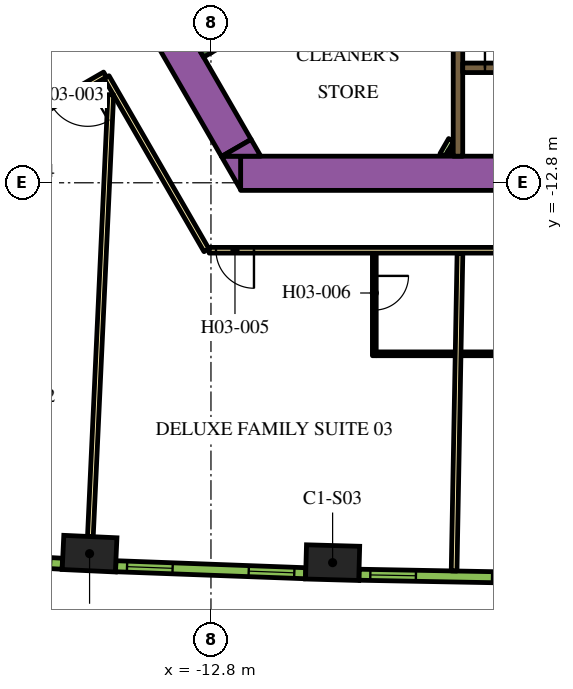
"""IFC4 building model, lengths in metres.
Left out: names, types, materials, properties, quantities, classifications, styles, units other than length and angle.
Written with IfcOpenShell. Run it as: python <this file> out.ifc"""

import sys

from ifc_helpers import new_model, si_unit, direction, frame, frame_2d, origin, origin_2d, place, context, subcontext, project, spatial, polyline, rectangle, outline, extrude, element, fill, save


model = new_model("IFC4")
c1 = context("Model", 3, precision=1e-05, world=origin(), true_north=direction((0.0, 1.0)))
c2 = subcontext(c1, "Body", "Model", "MODEL_VIEW")
j1 = project(units=[si_unit("LENGTHUNIT", "METRE"), si_unit("PLANEANGLEUNIT", "RADIAN")], contexts=[c1])
p1 = place(None, origin())
s1 = spatial("IfcSite", under=j1, at=p1, CompositionType="ELEMENT")
p2 = place(p1, origin())
s2 = spatial("IfcBuilding", under=s1, at=p2, CompositionType="ELEMENT")
p3 = place(p2, frame((0.0, 0.0, 51.0)))
s3 = spatial("IfcBuildingStorey", under=s2, at=p3, CompositionType="ELEMENT", Elevation=51.0)
for number, where, z_axis, x_axis in (
    (1, (-15.994, -22.558, 0.0), (0.0, 0.0, 1.0), (0.999, -0.046, 0.0)),
    (2, (-9.599, -22.795, 0.0), (0.0, 0.0, 1.0), (1.0, -0.028, 0.0)),
):
    element("IfcColumn", number, at=place(p3, frame(where, z_axis=z_axis, x_axis=x_axis)), inside=s3, PredefinedType="COLUMN", context=c2, shape_type="SweptSolid", body=[
        extrude(rectangle(XDim=1.4, YDim=0.9, at=origin_2d()), origin(), (0.0, 0.0, 1.0), 3.9),
    ])
p4 = place(p3, frame((-12.019, -12.55, 0.0), z_axis=(0.0, 0.0, 1.0), x_axis=(1.0, 0.0, 0.0)))
e3 = element("IfcWall", 3, at=p4, inside=s3, PredefinedType="SOLIDWALL", context=c2, shape_type="SweptSolid", body=[
    extrude(rectangle(XDim=22.083, YDim=0.9, at=frame_2d((11.042, 0.0))), origin(), (0.0, 0.0, 1.0), 3.9),
])
p5 = place(p3, origin())
e4 = element("IfcWall", 4, at=p5, inside=s3, PredefinedType="SOLIDWALL", context=c2, shape_type="SweptSolid", body=[
    extrude(outline(polyline([(-12.529, -12.1), (-12.021, -12.1), (-12.021, -12.98), (-12.529, -12.1)])), origin(), (0.0, 0.0, 1.0), 3.9),
])
p6 = place(p3, frame((-12.134, -11.883, 0.0), z_axis=(0.0, 0.0, 1.0), x_axis=(-0.500005339912, 0.866022320763, 0.0)))
e5 = element("IfcWall", 5, at=p6, inside=s3, PredefinedType="SOLIDWALL", context=c2, shape_type="SweptSolid", body=[
    extrude(rectangle(XDim=9.488, YDim=0.9, at=frame_2d((4.744, 0.0))), origin(), (0.0, 0.0, 1.0), 3.9),
])
e6 = element("IfcWall", 6, at=p5, inside=s3, PredefinedType="SOLIDWALL", context=c2, shape_type="SweptSolid", body=[
    extrude(outline(polyline([(-11.489, -12.1), (-12.505, -12.1), (-11.743, -11.66), (-11.489, -12.1)])), origin(), (0.0, 0.0, 1.0), 3.9),
])
p7 = place(p3, frame((-12.885, -9.431, 0.0), z_axis=(0.0, 0.0, 1.0), x_axis=(-0.500020560727, 0.866013532718, 0.0)))
e7 = element("IfcWall", 7, at=p7, inside=s3, PredefinedType="SOLIDWALL", context=c2, shape_type="SweptSolid", body=[
    extrude(rectangle(XDim=3.45, YDim=0.25, at=frame_2d((1.725, 0.0))), origin(), (0.0, 0.0, 1.0), 3.9),
])
p8 = place(p3, frame((-12.84, -9.261, 0.0), z_axis=(0.0, 0.0, 1.0), x_axis=(0.866016039709, 0.500016218704, 0.0)))
e8 = element("IfcWall", 8, at=p8, inside=s3, PredefinedType="SOLIDWALL", context=c2, shape_type="SweptSolid", body=[
    extrude(rectangle(XDim=7.05, YDim=0.25, at=frame_2d((3.525, 0.0))), origin(), (0.0, 0.0, 1.0), 3.9),
])
p9 = place(p3, frame((-6.3, -12.1, 0.0), z_axis=(0.0, 0.0, 1.0), x_axis=(0.0, 1.0, 0.0)))
e9 = element("IfcWall", 9, at=p9, inside=s3, PredefinedType="SOLIDWALL", context=c2, shape_type="SweptSolid", body=[
    extrude(rectangle(XDim=3.146, YDim=0.25, at=frame_2d((1.573, 0.0))), origin(), (0.0, 0.0, 1.0), 3.9),
])
p10 = place(p3, frame((-6.708, -12.068, 0.0), z_axis=(0.0, 0.0, 1.0), x_axis=(0.500000789788, 0.8660249478, 0.0)))
e10 = element("IfcWall", 10, at=p10, inside=s3, PredefinedType="PARTITIONING", context=c2, shape_type="SweptSolid", body=[
    extrude(rectangle(XDim=0.456, YDim=0.15, at=frame_2d((0.228, 0.0))), origin(), (0.0, 0.0, 1.0), 2.75),
])
p11 = place(p3, frame((-6.534, -12.068, 0.0), z_axis=(0.0, 0.0, 1.0), x_axis=(0.500240224089, 0.865886665912, 0.0)))
e11 = element("IfcWall", 11, at=p11, inside=s3, PredefinedType="PARTITIONING", context=c2, shape_type="SweptSolid", body=[
    extrude(rectangle(XDim=0.109, YDim=0.15, at=frame_2d((0.054, 0.0))), origin(), (0.0, 0.0, 1.0), 2.75),
])
p12 = place(p3, frame((-6.175, -9.775, 0.0), z_axis=(0.0, 0.0, 1.0), x_axis=(1.0, 0.0, 0.0)))
e12 = element("IfcWall", 12, at=p12, inside=s3, PredefinedType="SOLIDWALL", context=c2, shape_type="SweptSolid", body=[
    extrude(rectangle(XDim=12.35, YDim=0.25, at=frame_2d((6.175, 0.0))), origin(), (0.0, 0.0, 1.0), 3.9),
])
p13 = place(p12, frame((0.585, 0.0, 0.0)))
e13 = element("IfcOpeningElement", 13, at=p13, cuts=e12, PredefinedType="OPENING", context=c2, shape_type="SweptSolid", body=[
    extrude(rectangle(XDim=1.1, YDim=2.1, at=frame_2d((0.55, 1.05))), frame((0.0, 0.135, 0.0), z_axis=(0.0, -1.0, 0.0), x_axis=(1.0, 0.0, 0.0)), (0.0, 0.0, 1.0), 0.27),
])
p14 = place(p12, frame((3.105, 0.0, 0.0)))
e14 = element("IfcOpeningElement", 14, at=p14, cuts=e12, PredefinedType="OPENING", context=c2, shape_type="SweptSolid", body=[
    extrude(rectangle(XDim=1.1, YDim=2.1, at=frame_2d((0.55, 1.05))), frame((0.0, 0.135, 0.0), z_axis=(0.0, -1.0, 0.0), x_axis=(1.0, 0.0, 0.0)), (0.0, 0.0, 1.0), 0.27),
])
p15 = place(p12, frame((5.625, 0.0, 0.0)))
e15 = element("IfcOpeningElement", 15, at=p15, cuts=e12, PredefinedType="OPENING", context=c2, shape_type="SweptSolid", body=[
    extrude(rectangle(XDim=1.1, YDim=2.1, at=frame_2d((0.55, 1.05))), frame((0.0, 0.135, 0.0), z_axis=(0.0, -1.0, 0.0), x_axis=(1.0, 0.0, 0.0)), (0.0, 0.0, 1.0), 0.27),
])
p16 = place(p12, frame((8.145, 0.0, 0.0)))
e16 = element("IfcOpeningElement", 16, at=p16, cuts=e12, PredefinedType="OPENING", context=c2, shape_type="SweptSolid", body=[
    extrude(rectangle(XDim=1.1, YDim=2.1, at=frame_2d((0.55, 1.05))), frame((0.0, 0.135, 0.0), z_axis=(0.0, -1.0, 0.0), x_axis=(1.0, 0.0, 0.0)), (0.0, 0.0, 1.0), 0.27),
])
p17 = place(p12, frame((10.665, 0.0, 0.0)))
e17 = element("IfcOpeningElement", 17, at=p17, cuts=e12, PredefinedType="OPENING", context=c2, shape_type="SweptSolid", body=[
    extrude(rectangle(XDim=1.1, YDim=2.1, at=frame_2d((0.55, 1.05))), frame((0.0, 0.135, 0.0), z_axis=(0.0, -1.0, 0.0), x_axis=(1.0, 0.0, 0.0)), (0.0, 0.0, 1.0), 0.27),
])
p18 = place(p3, frame((-30.463, -16.635, 0.0), z_axis=(0.0, 0.0, 1.0), x_axis=(0.866022394896, 0.500005211512, 0.0)))
e18 = element("IfcWall", 18, at=p18, inside=s3, PredefinedType="PARTITIONING", context=c2, shape_type="SweptSolid", body=[
    extrude(rectangle(XDim=16.144, YDim=0.15, at=frame_2d((8.072, 0.0))), origin(), (0.0, 0.0, 1.0), 2.75),
])
p19 = place(p18, frame((11.004, 0.0, 0.0)))
e19 = element("IfcOpeningElement", 19, at=p19, cuts=e18, PredefinedType="OPENING", context=c2, shape_type="SweptSolid", body=[
    extrude(rectangle(XDim=1.0, YDim=2.1, at=frame_2d((0.5, 1.05))), frame((0.0, 0.085, 0.0), z_axis=(0.0, -1.0, 0.0), x_axis=(1.0, 0.0, 0.0)), (0.0, 0.0, 1.0), 0.17),
])
p20 = place(p18, frame((7.274, 0.0, 0.0)))
e20 = element("IfcOpeningElement", 20, at=p20, cuts=e18, PredefinedType="OPENING", context=c2, shape_type="SweptSolid", body=[
    extrude(rectangle(XDim=1.0, YDim=2.1, at=frame_2d((0.5, 1.05))), frame((0.0, 0.085, 0.0), z_axis=(0.0, -1.0, 0.0), x_axis=(1.0, 0.0, 0.0)), (0.0, 0.0, 1.0), 0.17),
])
p21 = place(p3, frame((-15.587, -9.952, 0.0), z_axis=(0.0, 0.0, 1.0), x_axis=(-0.866022197818, -0.500005552856, 0.0)))
e21 = element("IfcWall", 21, at=p21, inside=s3, PredefinedType="PARTITIONING", context=c2, shape_type="SweptSolid", body=[
    extrude(rectangle(XDim=16.224, YDim=0.15, at=frame_2d((8.112, 0.0))), origin(), (0.0, 0.0, 1.0), 2.75),
])
p22 = place(p21, frame((7.949, 0.0, 0.0)))
e22 = element("IfcOpeningElement", 22, at=p22, cuts=e21, PredefinedType="OPENING", context=c2, shape_type="SweptSolid", body=[
    extrude(rectangle(XDim=1.0, YDim=2.1, at=frame_2d((0.5, 1.05))), frame((0.0, 0.085, 0.0), z_axis=(0.0, -1.0, 0.0), x_axis=(1.0, 0.0, 0.0)), (0.0, 0.0, 1.0), 0.17),
])
p23 = place(p21, frame((0.525, 0.0, 0.0)))
e23 = element("IfcOpeningElement", 23, at=p23, cuts=e21, PredefinedType="OPENING", context=c2, shape_type="SweptSolid", body=[
    extrude(rectangle(XDim=1.1, YDim=2.1, at=frame_2d((0.55, 1.05))), frame((0.0, 0.085, 0.0), z_axis=(0.0, -1.0, 0.0), x_axis=(1.0, 0.0, 0.0)), (0.0, 0.0, 1.0), 0.17),
])
p24 = place(p3, frame((-12.918, -14.575, 0.0), z_axis=(0.0, 0.0, 1.0), x_axis=(-0.500009150678, 0.866020120573, 0.0)))
e24 = element("IfcWall", 24, at=p24, inside=s3, PredefinedType="PARTITIONING", context=c2, shape_type="SweptSolid", body=[
    extrude(rectangle(XDim=5.258, YDim=0.15, at=frame_2d((2.629, 0.0))), origin(), (0.0, 0.0, 1.0), 2.75),
])
p25 = place(p3, frame((12.918, -14.575, 0.0), z_axis=(0.0, 0.0, 1.0), x_axis=(-1.0, 0.0, 0.0)))
e25 = element("IfcWall", 25, at=p25, inside=s3, PredefinedType="PARTITIONING", context=c2, shape_type="SweptSolid", body=[
    extrude(rectangle(XDim=25.766, YDim=0.15, at=frame_2d((12.883, 0.0))), origin(), (0.0, 0.0, 1.0), 2.75),
])
p26 = place(p25, frame((24.586, 0.0, 0.0)))
e26 = element("IfcOpeningElement", 26, at=p26, cuts=e25, PredefinedType="OPENING", context=c2, shape_type="SweptSolid", body=[
    extrude(rectangle(XDim=1.0, YDim=2.1, at=frame_2d((0.5, 1.05))), frame((0.0, 0.085, 0.0), z_axis=(0.0, -1.0, 0.0), x_axis=(1.0, 0.0, 0.0)), (0.0, 0.0, 1.0), 0.17),
])
p27 = place(p25, frame((9.948, 0.0, 0.0)))
e27 = element("IfcOpeningElement", 27, at=p27, cuts=e25, PredefinedType="OPENING", context=c2, shape_type="SweptSolid", body=[
    extrude(rectangle(XDim=1.0, YDim=2.1, at=frame_2d((0.5, 1.05))), frame((0.0, 0.085, 0.0), z_axis=(0.0, -1.0, 0.0), x_axis=(1.0, 0.0, 0.0)), (0.0, 0.0, 1.0), 0.17),
])
p28 = place(p25, frame((8.642, 0.0, 0.0)))
e28 = element("IfcOpeningElement", 28, at=p28, cuts=e25, PredefinedType="OPENING", context=c2, shape_type="SweptSolid", body=[
    extrude(rectangle(XDim=1.0, YDim=2.1, at=frame_2d((0.5, 1.05))), frame((0.0, 0.085, 0.0), z_axis=(0.0, -1.0, 0.0), x_axis=(1.0, 0.0, 0.0)), (0.0, 0.0, 1.0), 0.17),
])
p29 = place(p25, frame((0.18, 0.0, 0.0)))
e29 = element("IfcOpeningElement", 29, at=p29, cuts=e25, PredefinedType="OPENING", context=c2, shape_type="SweptSolid", body=[
    extrude(rectangle(XDim=1.0, YDim=2.1, at=frame_2d((0.5, 1.05))), frame((0.0, 0.085, 0.0), z_axis=(0.0, -1.0, 0.0), x_axis=(1.0, 0.0, 0.0)), (0.0, 0.0, 1.0), 0.17),
])
p30 = place(p3, frame((-15.973, -22.109, 0.0), z_axis=(0.0, 0.0, 1.0), x_axis=(0.046191717129, 0.998932592955, 0.0)))
e30 = element("IfcWall", 30, at=p30, inside=s3, PredefinedType="PARTITIONING", context=c2, shape_type="SweptSolid", body=[
    extrude(rectangle(XDim=11.638, YDim=0.15, at=frame_2d((5.819, 0.0))), origin(), (0.0, 0.0, 1.0), 2.75),
])
p31 = place(p3, frame((-6.402, -23.014, 0.0), z_axis=(0.0, 0.0, 1.0), x_axis=(0.01849587109, 0.999828936745, 0.0)))
e31 = element("IfcWall", 31, at=p31, inside=s3, PredefinedType="PARTITIONING", context=c2, shape_type="SweptSolid", body=[
    extrude(rectangle(XDim=8.355, YDim=0.15, at=frame_2d((4.178, 0.0))), origin(), (0.0, 0.0, 1.0), 2.75),
])
p32 = place(p3, frame((-8.502, -14.65, 0.0), z_axis=(0.0, 0.0, 1.0), x_axis=(0.0, -1.0, 0.0)))
e32 = element("IfcWall", 32, at=p32, inside=s3, PredefinedType="PARTITIONING", context=c2, shape_type="SweptSolid", body=[
    extrude(rectangle(XDim=2.7, YDim=0.1, at=frame_2d((1.35, 0.0))), origin(), (0.0, 0.0, 1.0), 2.75),
])
p33 = place(p32, frame((0.6, 0.0, 0.0)))
e33 = element("IfcOpeningElement", 33, at=p33, cuts=e32, PredefinedType="OPENING", context=c2, shape_type="SweptSolid", body=[
    extrude(rectangle(XDim=0.9, YDim=2.1, at=frame_2d((0.45, 1.05))), frame((0.0, 0.06, 0.0), z_axis=(0.0, -1.0, 0.0), x_axis=(1.0, 0.0, 0.0)), (0.0, 0.0, 1.0), 0.12),
])
p34 = place(p3, frame((-8.452, -17.3, 0.0), z_axis=(0.0, 0.0, 1.0), x_axis=(1.0, 0.0, 0.0)))
e34 = element("IfcWall", 34, at=p34, inside=s3, PredefinedType="PARTITIONING", context=c2, shape_type="SweptSolid", body=[
    extrude(rectangle(XDim=2.07, YDim=0.1, at=frame_2d((1.035, 0.0))), origin(), (0.0, 0.0, 1.0), 2.75),
])
p35 = place(p3, frame((-4.044, -17.3, 0.0), z_axis=(0.0, 0.0, 1.0), x_axis=(-1.0, 0.0, 0.0)))
e35 = element("IfcWall", 35, at=p35, inside=s3, PredefinedType="PARTITIONING", context=c2, shape_type="SweptSolid", body=[
    extrude(rectangle(XDim=2.17, YDim=0.1, at=frame_2d((1.085, 0.0))), origin(), (0.0, 0.0, 1.0), 2.75),
])
p36 = place(p3, frame((-21.701, -22.547, 0.0), z_axis=(0.0, 0.0, 1.0), x_axis=(0.998464708705, -0.055391564976, 0.0)))
e36 = element("IfcWall", 36, at=p36, inside=s3, PredefinedType="SOLIDWALL", context=c2, shape_type="SweptSolid", body=[
    extrude(rectangle(XDim=4.998, YDim=0.29, at=frame_2d((2.499, 0.0))), origin(), (0.0, 0.0, 1.0), 3.65),
])
p37 = place(p36, frame((0.297, 0.0, 0.9)))
e37 = element("IfcOpeningElement", 37, at=p37, cuts=e36, PredefinedType="OPENING", context=c2, shape_type="SweptSolid", body=[
    extrude(rectangle(XDim=1.2, YDim=2.15, at=frame_2d((0.6, 1.075))), frame((0.0, 0.155, 0.0), z_axis=(0.0, -1.0, 0.0), x_axis=(1.0, 0.0, 0.0)), (0.0, 0.0, 1.0), 0.31),
])
p38 = place(p36, frame((3.501, 0.0, 0.9)))
e38 = element("IfcOpeningElement", 38, at=p38, cuts=e36, PredefinedType="OPENING", context=c2, shape_type="SweptSolid", body=[
    extrude(rectangle(XDim=1.2, YDim=2.15, at=frame_2d((0.6, 1.075))), frame((0.0, 0.155, 0.0), z_axis=(0.0, -1.0, 0.0), x_axis=(1.0, 0.0, 0.0)), (0.0, 0.0, 1.0), 0.31),
])
p39 = place(p3, frame((-15.305, -22.889, 0.0), z_axis=(0.0, 0.0, 1.0), x_axis=(0.999317974969, -0.036926750529, 0.0)))
e39 = element("IfcWall", 39, at=p39, inside=s3, PredefinedType="SOLIDWALL", context=c2, shape_type="SweptSolid", body=[
    extrude(rectangle(XDim=4.998, YDim=0.29, at=frame_2d((2.499, 0.0))), origin(), (0.0, 0.0, 1.0), 3.65),
])
p40 = place(p39, frame((0.297, 0.0, 0.9)))
e40 = element("IfcOpeningElement", 40, at=p40, cuts=e39, PredefinedType="OPENING", context=c2, shape_type="SweptSolid", body=[
    extrude(rectangle(XDim=1.2, YDim=2.15, at=frame_2d((0.6, 1.075))), frame((0.0, 0.155, 0.0), z_axis=(0.0, -1.0, 0.0), x_axis=(1.0, 0.0, 0.0)), (0.0, 0.0, 1.0), 0.31),
])
p41 = place(p39, frame((3.501, 0.0, 0.9)))
e41 = element("IfcOpeningElement", 41, at=p41, cuts=e39, PredefinedType="OPENING", context=c2, shape_type="SweptSolid", body=[
    extrude(rectangle(XDim=1.2, YDim=2.15, at=frame_2d((0.6, 1.075))), frame((0.0, 0.155, 0.0), z_axis=(0.0, -1.0, 0.0), x_axis=(1.0, 0.0, 0.0)), (0.0, 0.0, 1.0), 0.31),
])
p42 = place(p3, frame((-8.904, -23.113, 0.0), z_axis=(0.0, 0.0, 1.0), x_axis=(0.999829529479, -0.018463801951, 0.0)))
e42 = element("IfcWall", 42, at=p42, inside=s3, PredefinedType="SOLIDWALL", context=c2, shape_type="SweptSolid", body=[
    extrude(rectangle(XDim=4.998, YDim=0.29, at=frame_2d((2.499, 0.0))), origin(), (0.0, 0.0, 1.0), 3.65),
])
p43 = place(p42, frame((0.297, 0.0, 0.9)))
e43 = element("IfcOpeningElement", 43, at=p43, cuts=e42, PredefinedType="OPENING", context=c2, shape_type="SweptSolid", body=[
    extrude(rectangle(XDim=1.2, YDim=2.15, at=frame_2d((0.6, 1.075))), frame((0.0, 0.155, 0.0), z_axis=(0.0, -1.0, 0.0), x_axis=(1.0, 0.0, 0.0)), (0.0, 0.0, 1.0), 0.31),
])
p44 = place(p42, frame((3.501, 0.0, 0.9)))
e44 = element("IfcOpeningElement", 44, at=p44, cuts=e42, PredefinedType="OPENING", context=c2, shape_type="SweptSolid", body=[
    extrude(rectangle(XDim=1.2, YDim=2.15, at=frame_2d((0.6, 1.075))), frame((0.0, 0.155, 0.0), z_axis=(0.0, -1.0, 0.0), x_axis=(1.0, 0.0, 0.0)), (0.0, 0.0, 1.0), 0.31),
])
p45 = place(p13, origin())
e45 = element("IfcDoor", 45, at=p45, inside=s3, OperationType="DOUBLE_DOOR_SLIDING", PredefinedType="DOOR", context=c2, shape_type="SweptSolid", body=[
    extrude(rectangle(XDim=1.1, YDim=2.1, at=frame_2d((0.55, 1.05))), frame((0.0, 0.025, 0.0), z_axis=(0.0, -1.0, 0.0), x_axis=(1.0, 0.0, 0.0)), (0.0, 0.0, 1.0), 0.05),
])
fill(e13, e45)
p46 = place(p23, origin())
e46 = element("IfcDoor", 46, at=p46, inside=s3, OperationType="SINGLE_SWING_LEFT", PredefinedType="DOOR", context=c2, shape_type="SweptSolid", body=[
    extrude(rectangle(XDim=1.1, YDim=2.1, at=frame_2d((0.55, 1.05))), frame((0.0, 0.025, 0.0), z_axis=(0.0, -1.0, 0.0), x_axis=(1.0, 0.0, 0.0)), (0.0, 0.0, 1.0), 0.05),
])
fill(e23, e46)
p47 = place(p26, origin())
e47 = element("IfcDoor", 47, at=p47, inside=s3, OperationType="SINGLE_SWING_RIGHT", PredefinedType="DOOR", context=c2, shape_type="SweptSolid", body=[
    extrude(rectangle(XDim=1.0, YDim=2.1, at=frame_2d((0.5, 1.05))), frame((0.0, 0.025, 0.0), z_axis=(0.0, -1.0, 0.0), x_axis=(1.0, 0.0, 0.0)), (0.0, 0.0, 1.0), 0.05),
])
fill(e26, e47)
p48 = place(p33, origin())
e48 = element("IfcDoor", 48, at=p48, inside=s3, OperationType="SINGLE_SWING_RIGHT", PredefinedType="DOOR", context=c2, shape_type="SweptSolid", body=[
    extrude(rectangle(XDim=0.9, YDim=2.1, at=frame_2d((0.45, 1.05))), frame((0.0, 0.025, 0.0), z_axis=(0.0, -1.0, 0.0), x_axis=(1.0, 0.0, 0.0)), (0.0, 0.0, 1.0), 0.05),
])
fill(e33, e48)
p49 = place(p40, origin())
e49 = element("IfcWindow", 49, at=p49, inside=s3, PartitioningType="DOUBLE_PANEL_VERTICAL", PredefinedType="WINDOW", context=c2, shape_type="SweptSolid", body=[
    extrude(rectangle(XDim=1.2, YDim=2.15, at=frame_2d((0.6, 1.075))), frame((0.0, 0.015, 0.0), z_axis=(0.0, -1.0, 0.0), x_axis=(1.0, 0.0, 0.0)), (0.0, 0.0, 1.0), 0.06),
])
fill(e40, e49)
p50 = place(p41, origin())
e50 = element("IfcWindow", 50, at=p50, inside=s3, PartitioningType="DOUBLE_PANEL_VERTICAL", PredefinedType="WINDOW", context=c2, shape_type="SweptSolid", body=[
    extrude(rectangle(XDim=1.2, YDim=2.15, at=frame_2d((0.6, 1.075))), frame((0.0, 0.015, 0.0), z_axis=(0.0, -1.0, 0.0), x_axis=(1.0, 0.0, 0.0)), (0.0, 0.0, 1.0), 0.06),
])
fill(e41, e50)
p51 = place(p43, origin())
e51 = element("IfcWindow", 51, at=p51, inside=s3, PartitioningType="DOUBLE_PANEL_VERTICAL", PredefinedType="WINDOW", context=c2, shape_type="SweptSolid", body=[
    extrude(rectangle(XDim=1.2, YDim=2.15, at=frame_2d((0.6, 1.075))), frame((0.0, 0.015, 0.0), z_axis=(0.0, -1.0, 0.0), x_axis=(1.0, 0.0, 0.0)), (0.0, 0.0, 1.0), 0.06),
])
fill(e43, e51)
p52 = place(p44, origin())
e52 = element("IfcWindow", 52, at=p52, inside=s3, PartitioningType="DOUBLE_PANEL_VERTICAL", PredefinedType="WINDOW", context=c2, shape_type="SweptSolid", body=[
    extrude(rectangle(XDim=1.2, YDim=2.15, at=frame_2d((0.6, 1.075))), frame((0.0, 0.015, 0.0), z_axis=(0.0, -1.0, 0.0), x_axis=(1.0, 0.0, 0.0)), (0.0, 0.0, 1.0), 0.06),
])
fill(e44, e52)
save(model, sys.argv[1])
